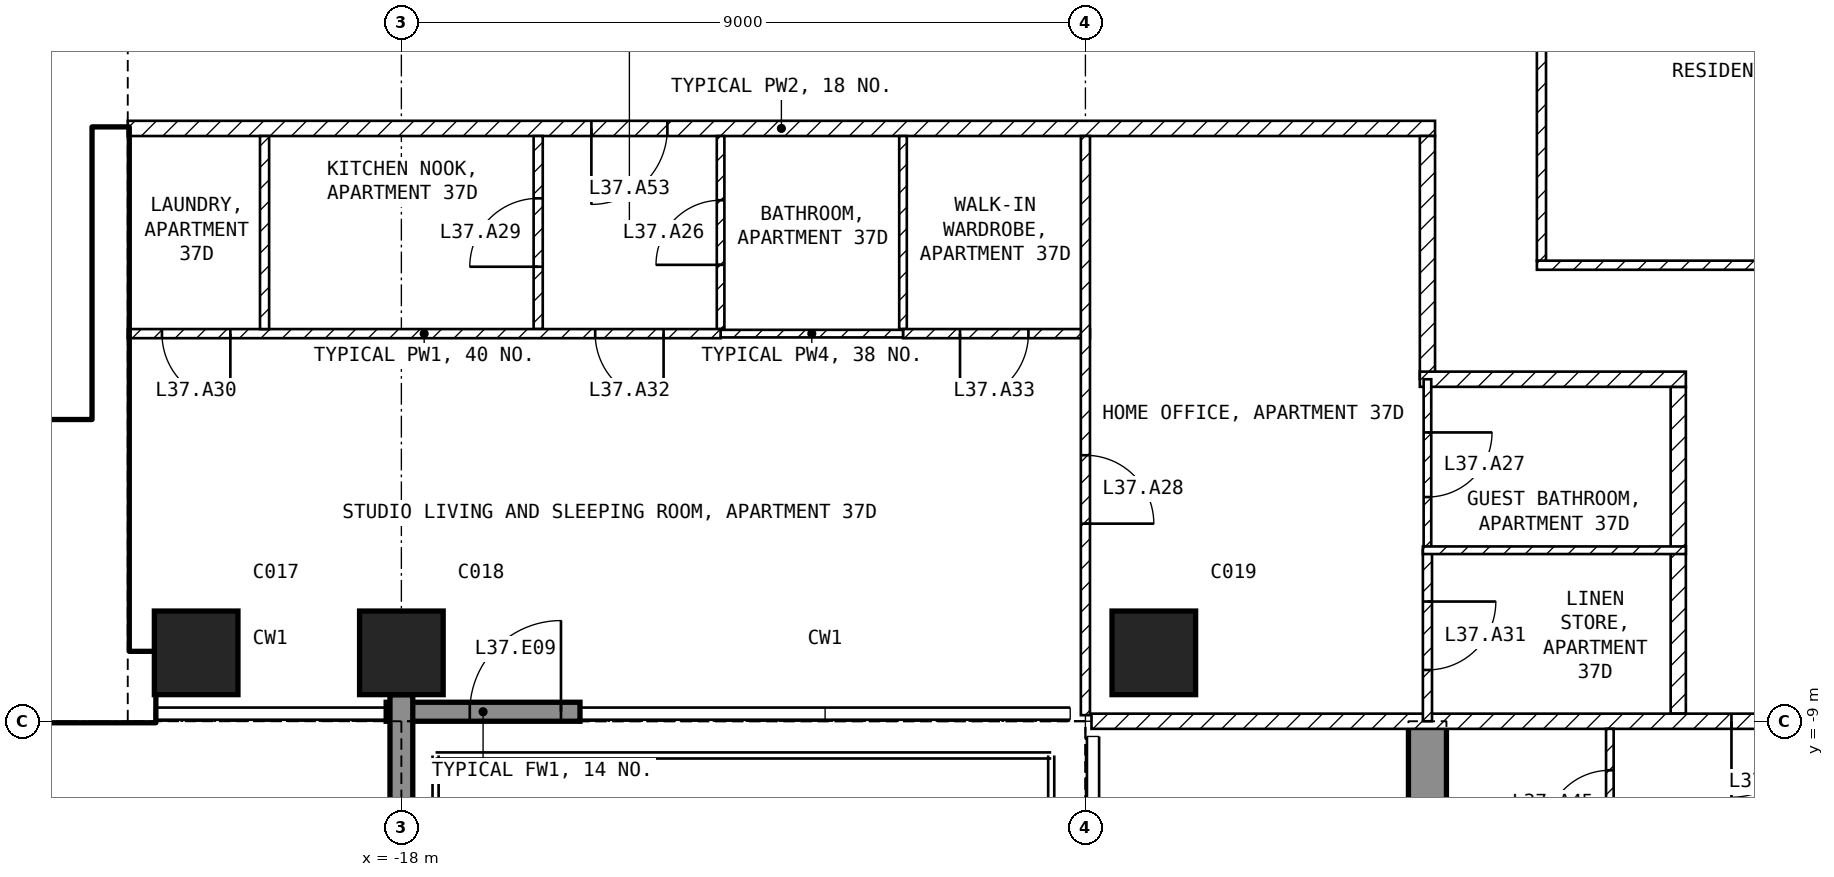
"""IFC4 building model, lengths in metres.
Left out: names, types, materials, properties, quantities, classifications, styles, units other than length and angle.
Written with IfcOpenShell. Run it as: python <this file> out.ifc"""

import sys

from ifc_helpers import new_model, si_unit, direction, frame, frame_2d, origin, origin_2d, place, context, subcontext, project, spatial, polyline, rectangle, outline, extrude, element, fill, save


model = new_model("IFC4")
c1 = context("Model", 3, precision=1e-05, world=origin(), true_north=direction((0.0, 1.0)))
c2 = subcontext(c1, "Body", "Model", "MODEL_VIEW")
j1 = project(units=[si_unit("LENGTHUNIT", "METRE"), si_unit("PLANEANGLEUNIT", "RADIAN")], contexts=[c1])
p1 = place(None, origin())
s1 = spatial("IfcSite", under=j1, at=p1, CompositionType="ELEMENT")
p2 = place(p1, origin())
s2 = spatial("IfcBuilding", under=s1, at=p2, CompositionType="ELEMENT")
p3 = place(p2, frame((0.0, 0.0, 151.4)))
s3 = spatial("IfcBuildingStorey", under=s2, at=p3, CompositionType="ELEMENT", Elevation=151.4)
for number, where, z_axis, x_axis in (
    (1, (-20.7, -8.1, -0.25), (0.0, 0.0, 1.0), (1.0, 0.0, 0.0)),
    (2, (-18.0, -8.1, -0.25), (0.0, 0.0, 1.0), (1.0, 0.0, 0.0)),
    (3, (-8.1, -8.1, -0.25), (0.0, 0.0, 1.0), (1.0, 0.0, 0.0)),
):
    element("IfcColumn", number, at=place(p3, frame(where, z_axis=z_axis, x_axis=x_axis)), inside=s3, PredefinedType="COLUMN", context=c2, shape_type="SweptSolid", body=[
        extrude(rectangle(XDim=1.1, YDim=1.1, at=origin_2d()), origin(), (0.0, 0.0, 1.0), 3.45),
    ])
p4 = place(p3, frame((-4.75, -20.15, -0.25), z_axis=(1.0, 0.0, 0.0), x_axis=(0.0, 1.0, 0.0)))
e4 = element("IfcWall", 4, at=p4, inside=s3, PredefinedType="SHEAR", context=c2, shape_type="SweptSolid", body=[
    extrude(outline(polyline([(0.0, 0.0), (6.65, 0.0), (6.65, 2.65), (9.05, 2.65), (9.05, 0.0), (11.15, 0.0), (11.15, 3.45), (0.0, 3.45), (0.0, 0.0)])), origin(), (0.0, 0.0, 1.0), 0.5),
])
p5 = place(p3, frame((-18.2, -8.875, 0.0), z_axis=(0.0, 0.0, 1.0), x_axis=(1.0, 0.0, 0.0)))
e5 = element("IfcWall", 5, at=p5, inside=s3, PredefinedType="SOLIDWALL", context=c2, shape_type="SweptSolid", body=[
    extrude(rectangle(XDim=2.55, YDim=0.25, at=frame_2d((1.275, 0.0))), origin(), (0.0, 0.0, 1.0), 3.2),
])
p6 = place(p5, frame((1.1, 0.0, 0.0)))
e6 = element("IfcOpeningElement", 6, at=p6, cuts=e5, PredefinedType="OPENING", context=c2, shape_type="SweptSolid", body=[
    extrude(rectangle(XDim=1.2, YDim=2.4, at=frame_2d((0.6, 1.2))), frame((0.0, 0.135, 0.0), z_axis=(0.0, -1.0, 0.0), x_axis=(1.0, 0.0, 0.0)), (0.0, 0.0, 1.0), 0.27),
])
p7 = place(p3, frame((-18.0, -8.65, 0.0), z_axis=(0.0, 0.0, 1.0), x_axis=(0.0, -1.0, 0.0)))
e7 = element("IfcWall", 7, at=p7, inside=s3, PredefinedType="SOLIDWALL", context=c2, shape_type="SweptSolid", body=[
    extrude(rectangle(XDim=3.09, YDim=0.3, at=frame_2d((1.545, 0.0))), origin(), (0.0, 0.0, 1.0), 3.2),
])
p8 = place(p3, frame((-30.2, -8.55, 0.0), z_axis=(0.0, 0.0, 1.0), x_axis=(1.0, 0.0, 0.0)))
e8 = element("IfcWall", 8, at=p8, inside=s3, PredefinedType="SHEAR", context=c2, shape_type="SweptSolid", body=[
    extrude(rectangle(XDim=8.95, YDim=0.9, at=frame_2d((4.475, 0.0))), origin(), (0.0, 0.0, 1.0), 3.2),
])
p9 = place(p3, frame((-21.825, -8.1, 0.0), z_axis=(0.0, 0.0, 1.0), x_axis=(0.0, 1.0, 0.0)))
e9 = element("IfcWall", 9, at=p9, inside=s3, PredefinedType="SHEAR", context=c2, shape_type="SweptSolid", body=[
    extrude(rectangle(XDim=6.9, YDim=0.45, at=frame_2d((3.45, 0.0))), origin(), (0.0, 0.0, 1.0), 3.2),
])
p10 = place(p3, frame((-28.35, -5.15, 0.0), z_axis=(0.0, 0.0, 1.0), x_axis=(1.0, 0.0, 0.0)))
e10 = element("IfcWall", 10, at=p10, inside=s3, PredefinedType="SOLIDWALL", context=c2, shape_type="SweptSolid", body=[
    extrude(rectangle(XDim=6.3, YDim=0.2, at=frame_2d((3.15, 0.0))), origin(), (0.0, 0.0, 1.0), 3.2),
])
p11 = place(p10, frame((5.1, 0.0, 0.0)))
e11 = element("IfcOpeningElement", 11, at=p11, cuts=e10, PredefinedType="OPENING", context=c2, shape_type="SweptSolid", body=[
    extrude(rectangle(XDim=1.0, YDim=2.1, at=frame_2d((0.5, 1.05))), frame((0.0, 0.11, 0.0), z_axis=(0.0, -1.0, 0.0), x_axis=(1.0, 0.0, 0.0)), (0.0, 0.0, 1.0), 0.22),
])
p12 = place(p3, frame((-3.06, -3.0, 0.0), z_axis=(0.0, 0.0, 1.0), x_axis=(1.0, 0.0, 0.0)))
e12 = element("IfcWall", 12, at=p12, inside=s3, PredefinedType="PARTITIONING", context=c2, shape_type="SweptSolid", body=[
    extrude(rectangle(XDim=6.12, YDim=0.12, at=frame_2d((3.06, 0.0))), origin(), (0.0, 0.0, 1.0), 3.2),
])
p13 = place(p3, frame((-3.0, 2.94, 0.0), z_axis=(0.0, 0.0, 1.0), x_axis=(0.0, -1.0, 0.0)))
e13 = element("IfcWall", 13, at=p13, inside=s3, PredefinedType="PARTITIONING", context=c2, shape_type="SweptSolid", body=[
    extrude(rectangle(XDim=5.88, YDim=0.12, at=frame_2d((2.94, 0.0))), origin(), (0.0, 0.0, 1.0), 3.2),
])
p14 = place(p3, frame((-4.4, -1.2, 0.0), z_axis=(0.0, 0.0, 1.0), x_axis=(-1.0, 0.0, 0.0)))
e14 = element("IfcWall", 14, at=p14, inside=s3, PredefinedType="PARTITIONING", context=c2, shape_type="SweptSolid", body=[
    extrude(rectangle(XDim=17.2, YDim=0.2, at=frame_2d((8.6, 0.0))), origin(), (0.0, 0.0, 1.0), 3.2),
])
p15 = place(p14, frame((10.1, 0.0, 0.0)))
e15 = element("IfcOpeningElement", 15, at=p15, cuts=e14, PredefinedType="OPENING", context=c2, shape_type="SweptSolid", body=[
    extrude(rectangle(XDim=1.0, YDim=2.1, at=frame_2d((0.5, 1.05))), frame((0.0, 0.11, 0.0), z_axis=(0.0, -1.0, 0.0), x_axis=(1.0, 0.0, 0.0)), (0.0, 0.0, 1.0), 0.22),
])
p16 = place(p3, frame((-4.5, -4.5, 0.0), z_axis=(0.0, 0.0, 1.0), x_axis=(0.0, 1.0, 0.0)))
e16 = element("IfcWall", 16, at=p16, inside=s3, PredefinedType="PARTITIONING", context=c2, shape_type="SweptSolid", body=[
    extrude(rectangle(XDim=3.2, YDim=0.2, at=frame_2d((1.6, 0.0))), origin(), (0.0, 0.0, 1.0), 3.2),
])
p17 = place(p3, frame((-1.2, -8.9, 0.0), z_axis=(0.0, 0.0, 1.0), x_axis=(0.0, 1.0, 0.0)))
e17 = element("IfcWall", 17, at=p17, inside=s3, PredefinedType="PARTITIONING", context=c2, shape_type="SweptSolid", body=[
    extrude(rectangle(XDim=4.3, YDim=0.2, at=frame_2d((2.15, 0.0))), origin(), (0.0, 0.0, 1.0), 3.2),
])
p18 = place(p3, frame((-1.1, -4.5, 0.0), z_axis=(0.0, 0.0, 1.0), x_axis=(-1.0, 0.0, 0.0)))
e18 = element("IfcWall", 18, at=p18, inside=s3, PredefinedType="PARTITIONING", context=c2, shape_type="SweptSolid", body=[
    extrude(rectangle(XDim=3.5, YDim=0.2, at=frame_2d((1.75, 0.0))), origin(), (0.0, 0.0, 1.0), 3.2),
])
p19 = place(p3, frame((8.92, -9.0, 0.0), z_axis=(0.0, 0.0, 1.0), x_axis=(-1.0, 0.0, 0.0)))
e19 = element("IfcWall", 19, at=p19, inside=s3, PredefinedType="PARTITIONING", context=c2, shape_type="SweptSolid", body=[
    extrude(rectangle(XDim=17.84, YDim=0.2, at=frame_2d((8.92, 0.0))), origin(), (0.0, 0.0, 1.0), 3.2),
])
p20 = place(p19, frame((8.42, 0.0, 0.0)))
e20 = element("IfcOpeningElement", 20, at=p20, cuts=e19, PredefinedType="OPENING", context=c2, shape_type="SweptSolid", body=[
    extrude(rectangle(XDim=1.0, YDim=2.1, at=frame_2d((0.5, 1.05))), frame((0.0, 0.11, 0.0), z_axis=(0.0, -1.0, 0.0), x_axis=(1.0, 0.0, 0.0)), (0.0, 0.0, 1.0), 0.22),
])
p21 = place(p3, frame((-11.4, -3.84, 0.0), z_axis=(0.0, 0.0, 1.0), x_axis=(0.0, 1.0, 0.0)))
e21 = element("IfcWall", 21, at=p21, inside=s3, PredefinedType="PARTITIONING", context=c2, shape_type="SweptSolid", body=[
    extrude(rectangle(XDim=2.54, YDim=0.1, at=frame_2d((1.27, 0.0))), origin(), (0.0, 0.0, 1.0), 3.2),
])
p22 = place(p3, frame((-8.94, -3.9, 0.0), z_axis=(0.0, 0.0, 1.0), x_axis=(-1.0, 0.0, 0.0)))
e22 = element("IfcWall", 22, at=p22, inside=s3, PredefinedType="PARTITIONING", context=c2, shape_type="SweptSolid", body=[
    extrude(rectangle(XDim=2.46, YDim=0.12, at=frame_2d((1.23, 0.0))), origin(), (0.0, 0.0, 1.0), 3.2),
])
p23 = place(p22, frame((0.81, 0.0, 0.0)))
e23 = element("IfcOpeningElement", 23, at=p23, cuts=e22, PredefinedType="OPENING", context=c2, shape_type="SweptSolid", body=[
    extrude(rectangle(XDim=0.9, YDim=2.1, at=frame_2d((0.45, 1.05))), frame((0.0, 0.07, 0.0), z_axis=(0.0, -1.0, 0.0), x_axis=(1.0, 0.0, 0.0)), (0.0, 0.0, 1.0), 0.14),
])
p24 = place(p3, frame((-9.0, -1.3, 0.0), z_axis=(0.0, 0.0, 1.0), x_axis=(0.0, -1.0, 0.0)))
e24 = element("IfcWall", 24, at=p24, inside=s3, PredefinedType="PARTITIONING", context=c2, shape_type="SweptSolid", body=[
    extrude(rectangle(XDim=7.62, YDim=0.12, at=frame_2d((3.81, 0.0))), origin(), (0.0, 0.0, 1.0), 3.2),
])
p25 = place(p24, frame((4.2, 0.0, 0.0)))
e25 = element("IfcOpeningElement", 25, at=p25, cuts=e24, PredefinedType="OPENING", context=c2, shape_type="SweptSolid", body=[
    extrude(rectangle(XDim=0.9, YDim=2.1, at=frame_2d((0.45, 1.05))), frame((0.0, 0.07, 0.0), z_axis=(0.0, -1.0, 0.0), x_axis=(1.0, 0.0, 0.0)), (0.0, 0.0, 1.0), 0.14),
])
p26 = place(p3, frame((-13.8, -3.84, 0.0), z_axis=(0.0, 0.0, 1.0), x_axis=(0.0, 1.0, 0.0)))
e26 = element("IfcWall", 26, at=p26, inside=s3, PredefinedType="PARTITIONING", context=c2, shape_type="SweptSolid", body=[
    extrude(rectangle(XDim=2.54, YDim=0.1, at=frame_2d((1.27, 0.0))), origin(), (0.0, 0.0, 1.0), 3.2),
])
p27 = place(p26, frame((0.845, 0.0, 0.0)))
e27 = element("IfcOpeningElement", 27, at=p27, cuts=e26, PredefinedType="OPENING", context=c2, shape_type="SweptSolid", body=[
    extrude(rectangle(XDim=0.85, YDim=2.1, at=frame_2d((0.425, 1.05))), frame((0.0, 0.06, 0.0), z_axis=(0.0, -1.0, 0.0), x_axis=(1.0, 0.0, 0.0)), (0.0, 0.0, 1.0), 0.12),
])
p28 = place(p3, frame((-11.4, -3.9, 0.0), z_axis=(0.0, 0.0, 1.0), x_axis=(-1.0, 0.0, 0.0)))
e28 = element("IfcWall", 28, at=p28, inside=s3, PredefinedType="PARTITIONING", context=c2, shape_type="SweptSolid", body=[
    extrude(rectangle(XDim=2.4, YDim=0.1, at=frame_2d((1.2, 0.0))), origin(), (0.0, 0.0, 1.0), 3.2),
])
p29 = place(p3, frame((-16.2, -3.84, 0.0), z_axis=(0.0, 0.0, 1.0), x_axis=(0.0, 1.0, 0.0)))
e29 = element("IfcWall", 29, at=p29, inside=s3, PredefinedType="PARTITIONING", context=c2, shape_type="SweptSolid", body=[
    extrude(rectangle(XDim=2.54, YDim=0.12, at=frame_2d((1.27, 0.0))), origin(), (0.0, 0.0, 1.0), 3.2),
])
p30 = place(p29, frame((0.82, 0.0, 0.0)))
e30 = element("IfcOpeningElement", 30, at=p30, cuts=e29, PredefinedType="OPENING", context=c2, shape_type="SweptSolid", body=[
    extrude(rectangle(XDim=0.9, YDim=2.1, at=frame_2d((0.45, 1.05))), frame((0.0, 0.07, 0.0), z_axis=(0.0, -1.0, 0.0), x_axis=(1.0, 0.0, 0.0)), (0.0, 0.0, 1.0), 0.14),
])
p31 = place(p3, frame((-13.8, -3.9, 0.0), z_axis=(0.0, 0.0, 1.0), x_axis=(-1.0, 0.0, 0.0)))
e31 = element("IfcWall", 31, at=p31, inside=s3, PredefinedType="PARTITIONING", context=c2, shape_type="SweptSolid", body=[
    extrude(rectangle(XDim=7.8, YDim=0.12, at=frame_2d((3.9, 0.0))), origin(), (0.0, 0.0, 1.0), 3.2),
])
p32 = place(p31, frame((6.45, 0.0, 0.0)))
e32 = element("IfcOpeningElement", 32, at=p32, cuts=e31, PredefinedType="OPENING", context=c2, shape_type="SweptSolid", body=[
    extrude(rectangle(XDim=0.9, YDim=2.1, at=frame_2d((0.45, 1.05))), frame((0.0, 0.07, 0.0), z_axis=(0.0, -1.0, 0.0), x_axis=(1.0, 0.0, 0.0)), (0.0, 0.0, 1.0), 0.14),
])
p33 = place(p31, frame((0.75, 0.0, 0.0)))
e33 = element("IfcOpeningElement", 33, at=p33, cuts=e31, PredefinedType="OPENING", context=c2, shape_type="SweptSolid", body=[
    extrude(rectangle(XDim=0.9, YDim=2.1, at=frame_2d((0.45, 1.05))), frame((0.0, 0.07, 0.0), z_axis=(0.0, -1.0, 0.0), x_axis=(1.0, 0.0, 0.0)), (0.0, 0.0, 1.0), 0.14),
])
p34 = place(p3, frame((-19.8, -3.84, 0.0), z_axis=(0.0, 0.0, 1.0), x_axis=(0.0, 1.0, 0.0)))
e34 = element("IfcWall", 34, at=p34, inside=s3, PredefinedType="PARTITIONING", context=c2, shape_type="SweptSolid", body=[
    extrude(rectangle(XDim=2.54, YDim=0.12, at=frame_2d((1.27, 0.0))), origin(), (0.0, 0.0, 1.0), 3.2),
])
p35 = place(p3, frame((-4.5, -4.5, 0.0), z_axis=(0.0, 0.0, 1.0), x_axis=(0.0, -1.0, 0.0)))
e35 = element("IfcWall", 35, at=p35, inside=s3, PredefinedType="PARTITIONING", context=c2, shape_type="SweptSolid", body=[
    extrude(rectangle(XDim=2.25, YDim=0.1, at=frame_2d((1.125, 0.0))), origin(), (0.0, 0.0, 1.0), 3.2),
])
p36 = place(p35, frame((0.7, 0.0, 0.0)))
e36 = element("IfcOpeningElement", 36, at=p36, cuts=e35, PredefinedType="OPENING", context=c2, shape_type="SweptSolid", body=[
    extrude(rectangle(XDim=0.85, YDim=2.1, at=frame_2d((0.425, 1.05))), frame((0.0, 0.06, 0.0), z_axis=(0.0, -1.0, 0.0), x_axis=(1.0, 0.0, 0.0)), (0.0, 0.0, 1.0), 0.12),
])
p37 = place(p3, frame((-4.5, -6.75, 0.0), z_axis=(0.0, 0.0, 1.0), x_axis=(0.0, -1.0, 0.0)))
e37 = element("IfcWall", 37, at=p37, inside=s3, PredefinedType="PARTITIONING", context=c2, shape_type="SweptSolid", body=[
    extrude(rectangle(XDim=2.25, YDim=0.12, at=frame_2d((1.125, 0.0))), origin(), (0.0, 0.0, 1.0), 3.2),
])
p38 = place(p37, frame((0.675, 0.0, 0.0)))
e38 = element("IfcOpeningElement", 38, at=p38, cuts=e37, PredefinedType="OPENING", context=c2, shape_type="SweptSolid", body=[
    extrude(rectangle(XDim=0.9, YDim=2.1, at=frame_2d((0.45, 1.05))), frame((0.0, 0.07, 0.0), z_axis=(0.0, -1.0, 0.0), x_axis=(1.0, 0.0, 0.0)), (0.0, 0.0, 1.0), 0.14),
])
p39 = place(p3, frame((-1.1, -6.75, 0.0), z_axis=(0.0, 0.0, 1.0), x_axis=(-1.0, 0.0, 0.0)))
e39 = element("IfcWall", 39, at=p39, inside=s3, PredefinedType="PARTITIONING", context=c2, shape_type="SweptSolid", body=[
    extrude(rectangle(XDim=3.46, YDim=0.1, at=frame_2d((1.73, 0.0))), origin(), (0.0, 0.0, 1.0), 3.2),
])
p40 = place(p3, frame((-2.1, -11.04, 0.0), z_axis=(0.0, 0.0, 1.0), x_axis=(0.0, 1.0, 0.0)))
e40 = element("IfcWall", 40, at=p40, inside=s3, PredefinedType="PARTITIONING", context=c2, shape_type="SweptSolid", body=[
    extrude(rectangle(XDim=1.94, YDim=0.1, at=frame_2d((0.97, 0.0))), origin(), (0.0, 0.0, 1.0), 3.2),
])
p41 = place(p40, frame((0.545, 0.0, 0.0)))
e41 = element("IfcOpeningElement", 41, at=p41, cuts=e40, PredefinedType="OPENING", context=c2, shape_type="SweptSolid", body=[
    extrude(rectangle(XDim=0.85, YDim=2.1, at=frame_2d((0.425, 1.05))), frame((0.0, 0.06, 0.0), z_axis=(0.0, -1.0, 0.0), x_axis=(1.0, 0.0, 0.0)), (0.0, 0.0, 1.0), 0.12),
])
p42 = place(p6, origin())
e42 = element("IfcDoor", 42, at=p42, inside=s3, OperationType="SINGLE_SWING_RIGHT", PredefinedType="DOOR", context=c2, shape_type="SweptSolid", body=[
    extrude(rectangle(XDim=1.2, YDim=2.4, at=frame_2d((0.6, 1.2))), frame((0.0, 0.025, 0.0), z_axis=(0.0, -1.0, 0.0), x_axis=(1.0, 0.0, 0.0)), (0.0, 0.0, 1.0), 0.05),
])
fill(e6, e42)
p43 = place(p11, origin())
e43 = element("IfcDoor", 43, at=p43, inside=s3, OperationType="SINGLE_SWING_LEFT", PredefinedType="DOOR", context=c2, shape_type="SweptSolid", body=[
    extrude(rectangle(XDim=1.0, YDim=2.1, at=frame_2d((0.5, 1.05))), frame((0.0, 0.025, 0.0), z_axis=(0.0, -1.0, 0.0), x_axis=(1.0, 0.0, 0.0)), (0.0, 0.0, 1.0), 0.05),
])
fill(e11, e43)
p44 = place(p27, origin())
e44 = element("IfcDoor", 44, at=p44, inside=s3, OperationType="SINGLE_SWING_LEFT", PredefinedType="DOOR", context=c2, shape_type="SweptSolid", body=[
    extrude(rectangle(XDim=0.85, YDim=2.1, at=frame_2d((0.425, 1.05))), frame((0.0, 0.025, 0.0), z_axis=(0.0, -1.0, 0.0), x_axis=(1.0, 0.0, 0.0)), (0.0, 0.0, 1.0), 0.05),
])
fill(e27, e44)
p45 = place(p36, origin())
e45 = element("IfcDoor", 45, at=p45, inside=s3, OperationType="SINGLE_SWING_LEFT", PredefinedType="DOOR", context=c2, shape_type="SweptSolid", body=[
    extrude(rectangle(XDim=0.85, YDim=2.1, at=frame_2d((0.425, 1.05))), frame((0.0, 0.025, 0.0), z_axis=(0.0, -1.0, 0.0), x_axis=(1.0, 0.0, 0.0)), (0.0, 0.0, 1.0), 0.05),
])
fill(e36, e45)
p46 = place(p25, origin())
e46 = element("IfcDoor", 46, at=p46, inside=s3, OperationType="SINGLE_SWING_RIGHT", PredefinedType="DOOR", context=c2, shape_type="SweptSolid", body=[
    extrude(rectangle(XDim=0.9, YDim=2.1, at=frame_2d((0.45, 1.05))), frame((0.0, 0.025, 0.0), z_axis=(0.0, -1.0, 0.0), x_axis=(1.0, 0.0, 0.0)), (0.0, 0.0, 1.0), 0.05),
])
fill(e25, e46)
p47 = place(p30, origin())
e47 = element("IfcDoor", 47, at=p47, inside=s3, OperationType="SINGLE_SWING_LEFT", PredefinedType="DOOR", context=c2, shape_type="SweptSolid", body=[
    extrude(rectangle(XDim=0.9, YDim=2.1, at=frame_2d((0.45, 1.05))), frame((0.0, 0.025, 0.0), z_axis=(0.0, -1.0, 0.0), x_axis=(1.0, 0.0, 0.0)), (0.0, 0.0, 1.0), 0.05),
])
fill(e30, e47)
p48 = place(p32, origin())
e48 = element("IfcDoor", 48, at=p48, inside=s3, OperationType="SINGLE_SWING_LEFT", PredefinedType="DOOR", context=c2, shape_type="SweptSolid", body=[
    extrude(rectangle(XDim=0.9, YDim=2.1, at=frame_2d((0.45, 1.05))), frame((0.0, 0.025, 0.0), z_axis=(0.0, -1.0, 0.0), x_axis=(1.0, 0.0, 0.0)), (0.0, 0.0, 1.0), 0.05),
])
fill(e32, e48)
p49 = place(p38, origin())
e49 = element("IfcDoor", 49, at=p49, inside=s3, OperationType="SINGLE_SWING_LEFT", PredefinedType="DOOR", context=c2, shape_type="SweptSolid", body=[
    extrude(rectangle(XDim=0.9, YDim=2.1, at=frame_2d((0.45, 1.05))), frame((0.0, 0.025, 0.0), z_axis=(0.0, -1.0, 0.0), x_axis=(1.0, 0.0, 0.0)), (0.0, 0.0, 1.0), 0.05),
])
fill(e38, e49)
p50 = place(p33, origin())
e50 = element("IfcDoor", 50, at=p50, inside=s3, OperationType="SINGLE_SWING_LEFT", PredefinedType="DOOR", context=c2, shape_type="SweptSolid", body=[
    extrude(rectangle(XDim=0.9, YDim=2.1, at=frame_2d((0.45, 1.05))), frame((0.0, 0.025, 0.0), z_axis=(0.0, -1.0, 0.0), x_axis=(1.0, 0.0, 0.0)), (0.0, 0.0, 1.0), 0.05),
])
fill(e33, e50)
p51 = place(p23, origin())
e51 = element("IfcDoor", 51, at=p51, inside=s3, OperationType="SINGLE_SWING_RIGHT", PredefinedType="DOOR", context=c2, shape_type="SweptSolid", body=[
    extrude(rectangle(XDim=0.9, YDim=2.1, at=frame_2d((0.45, 1.05))), frame((0.0, 0.025, 0.0), z_axis=(0.0, -1.0, 0.0), x_axis=(1.0, 0.0, 0.0)), (0.0, 0.0, 1.0), 0.05),
])
fill(e23, e51)
p52 = place(p20, origin())
e52 = element("IfcDoor", 52, at=p52, inside=s3, OperationType="SINGLE_SWING_RIGHT", PredefinedType="DOOR", context=c2, shape_type="SweptSolid", body=[
    extrude(rectangle(XDim=1.0, YDim=2.1, at=frame_2d((0.5, 1.05))), frame((0.0, 0.025, 0.0), z_axis=(0.0, -1.0, 0.0), x_axis=(1.0, 0.0, 0.0)), (0.0, 0.0, 1.0), 0.05),
])
fill(e20, e52)
p53 = place(p41, origin())
e53 = element("IfcDoor", 53, at=p53, inside=s3, OperationType="SINGLE_SWING_LEFT", PredefinedType="DOOR", context=c2, shape_type="SweptSolid", body=[
    extrude(rectangle(XDim=0.85, YDim=2.1, at=frame_2d((0.425, 1.05))), frame((0.0, 0.025, 0.0), z_axis=(0.0, -1.0, 0.0), x_axis=(1.0, 0.0, 0.0)), (0.0, 0.0, 1.0), 0.05),
])
fill(e41, e53)
p54 = place(p15, origin())
e54 = element("IfcDoor", 54, at=p54, inside=s3, OperationType="SINGLE_SWING_RIGHT", PredefinedType="DOOR", context=c2, shape_type="SweptSolid", body=[
    extrude(rectangle(XDim=1.0, YDim=2.1, at=frame_2d((0.5, 1.05))), frame((0.0, 0.025, 0.0), z_axis=(0.0, -1.0, 0.0), x_axis=(1.0, 0.0, 0.0)), (0.0, 0.0, 1.0), 0.05),
])
fill(e15, e54)
save(model, sys.argv[1])
